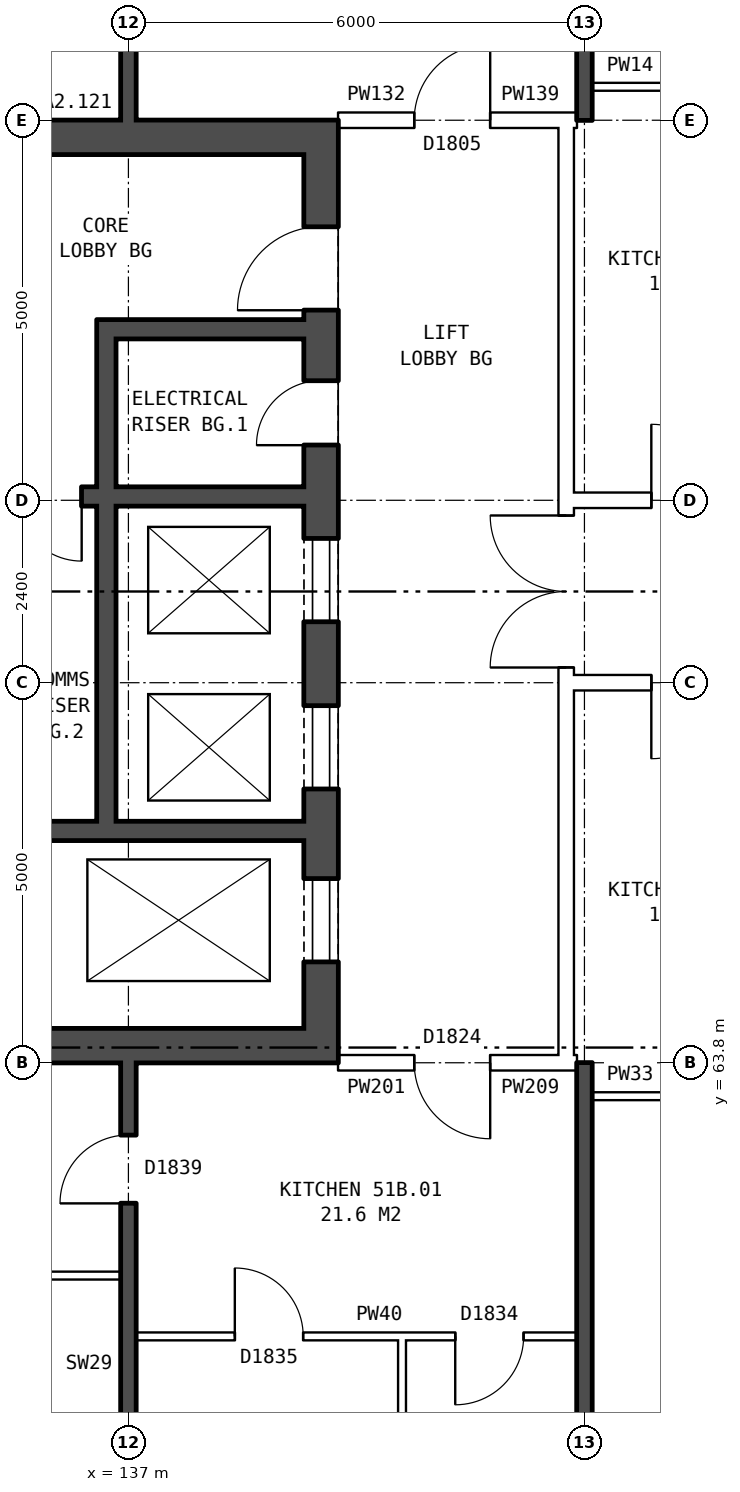
"""IFC4 building model, lengths in metres.
Left out: names, types, materials, properties, quantities, classifications, styles, units other than length and angle.
Written with IfcOpenShell. Run it as: python <this file> out.ifc"""

import sys

from ifc_helpers import new_model, si_unit, direction, frame, frame_2d, origin, place, context, subcontext, project, spatial, rectangle, extrude, element, fill, save


model = new_model("IFC4")
c1 = context("Model", 3, precision=1e-05, world=origin(), true_north=direction((0.0, 1.0)))
c2 = subcontext(c1, "Body", "Model", "MODEL_VIEW")
j1 = project(units=[si_unit("LENGTHUNIT", "METRE"), si_unit("PLANEANGLEUNIT", "RADIAN")], contexts=[c1])
p1 = place(None, origin())
s1 = spatial("IfcSite", under=j1, at=p1, CompositionType="ELEMENT")
p2 = place(p1, origin())
s2 = spatial("IfcBuilding", under=s1, at=p2, CompositionType="ELEMENT")
p3 = place(p2, frame((0.0, 0.0, 182.0)))
s3 = spatial("IfcBuildingStorey", under=s2, at=p3, CompositionType="ELEMENT", Elevation=182.0)
p4 = place(p3, frame((139.535, 63.8, 0.0), z_axis=(0.0, 0.0, 1.0), x_axis=(0.0, 1.0, 0.0)))
e1 = element("IfcWall", 1, at=p4, inside=s3, PredefinedType="SHEAR", context=c2, shape_type="SweptSolid", body=[
    extrude(rectangle(XDim=12.4, YDim=0.45, at=frame_2d((6.2, 0.0))), origin(), (0.0, 0.0, 1.0), 2.85),
])
p5 = place(p4, frame((1.325, 0.0, 0.0)))
e2 = element("IfcOpeningElement", 2, at=p5, cuts=e1, PredefinedType="OPENING", context=c2, shape_type="SweptSolid", body=[
    extrude(rectangle(XDim=1.1, YDim=2.1, at=frame_2d((0.55, 1.05))), frame((0.0, 0.235, 0.0), z_axis=(0.0, -1.0, 0.0), x_axis=(1.0, 0.0, 0.0)), (0.0, 0.0, 1.0), 0.47),
])
p6 = place(p4, frame((3.6, 0.0, 0.0)))
e3 = element("IfcOpeningElement", 3, at=p6, cuts=e1, PredefinedType="OPENING", context=c2, shape_type="SweptSolid", body=[
    extrude(rectangle(XDim=1.1, YDim=2.1, at=frame_2d((0.55, 1.05))), frame((0.0, 0.235, 0.0), z_axis=(0.0, -1.0, 0.0), x_axis=(1.0, 0.0, 0.0)), (0.0, 0.0, 1.0), 0.47),
])
p7 = place(p4, frame((5.8, 0.0, 0.0)))
e4 = element("IfcOpeningElement", 4, at=p7, cuts=e1, PredefinedType="OPENING", context=c2, shape_type="SweptSolid", body=[
    extrude(rectangle(XDim=1.1, YDim=2.1, at=frame_2d((0.55, 1.05))), frame((0.0, 0.235, 0.0), z_axis=(0.0, -1.0, 0.0), x_axis=(1.0, 0.0, 0.0)), (0.0, 0.0, 1.0), 0.47),
])
p8 = place(p4, frame((9.9, 0.0, 0.0)))
e5 = element("IfcOpeningElement", 5, at=p8, cuts=e1, PredefinedType="OPENING", context=c2, shape_type="SweptSolid", body=[
    extrude(rectangle(XDim=1.1, YDim=2.1, at=frame_2d((0.55, 1.05))), frame((0.0, 0.235, 0.0), z_axis=(0.0, -1.0, 0.0), x_axis=(1.0, 0.0, 0.0)), (0.0, 0.0, 1.0), 0.47),
])
p9 = place(p4, frame((8.125, 0.0, 0.0)))
e6 = element("IfcOpeningElement", 6, at=p9, cuts=e1, PredefinedType="OPENING", context=c2, shape_type="SweptSolid", body=[
    extrude(rectangle(XDim=0.85, YDim=2.1, at=frame_2d((0.425, 1.05))), frame((0.0, 0.235, 0.0), z_axis=(0.0, -1.0, 0.0), x_axis=(1.0, 0.0, 0.0)), (0.0, 0.0, 1.0), 0.47),
])
for number, where, z_axis, x_axis in (
    (7, (139.31, 64.025, 0.0), (0.0, 0.0, 1.0), (-1.0, 0.0, 0.0)),
    (8, (139.31, 75.975, 0.0), (0.0, 0.0, 1.0), (-1.0, 0.0, 0.0)),
):
    element("IfcWall", number, at=place(p3, frame(where, z_axis=z_axis, x_axis=x_axis)), inside=s3, PredefinedType="SHEAR", context=c2, shape_type="SweptSolid", body=[
        extrude(rectangle(XDim=7.5, YDim=0.45, at=frame_2d((3.75, 0.0))), origin(), (0.0, 0.0, 1.0), 2.85),
    ])
p10 = place(p3, frame((139.31, 66.85, 0.0), z_axis=(0.0, 0.0, 1.0), x_axis=(-1.0, 0.0, 0.0)))
e9 = element("IfcWall", 9, at=p10, inside=s3, PredefinedType="SHEAR", context=c2, shape_type="SweptSolid", body=[
    extrude(rectangle(XDim=4.675, YDim=0.25, at=frame_2d((2.337, 0.0))), origin(), (0.0, 0.0, 1.0), 2.85),
])
p11 = place(p3, frame((139.31, 71.25, 0.0), z_axis=(0.0, 0.0, 1.0), x_axis=(-1.0, 0.0, 0.0)))
e10 = element("IfcWall", 10, at=p11, inside=s3, PredefinedType="SHEAR", context=c2, shape_type="SweptSolid", body=[
    extrude(rectangle(XDim=7.5, YDim=0.25, at=frame_2d((3.75, 0.0))), origin(), (0.0, 0.0, 1.0), 2.85),
])
p12 = place(p11, frame((5.075, 0.0, 0.0)))
e11 = element("IfcOpeningElement", 11, at=p12, cuts=e10, PredefinedType="OPENING", context=c2, shape_type="SweptSolid", body=[
    extrude(rectangle(XDim=1.1, YDim=2.1, at=frame_2d((0.55, 1.05))), frame((0.0, 0.135, 0.0), z_axis=(0.0, -1.0, 0.0), x_axis=(1.0, 0.0, 0.0)), (0.0, 0.0, 1.0), 0.27),
])
p13 = place(p11, frame((2.925, 0.0, 0.0)))
e12 = element("IfcOpeningElement", 12, at=p13, cuts=e10, PredefinedType="OPENING", context=c2, shape_type="SweptSolid", body=[
    extrude(rectangle(XDim=0.85, YDim=2.1, at=frame_2d((0.425, 1.05))), frame((0.0, 0.135, 0.0), z_axis=(0.0, -1.0, 0.0), x_axis=(1.0, 0.0, 0.0)), (0.0, 0.0, 1.0), 0.27),
])
p14 = place(p3, frame((139.31, 73.45, 0.0), z_axis=(0.0, 0.0, 1.0), x_axis=(-1.0, 0.0, 0.0)))
e13 = element("IfcWall", 13, at=p14, inside=s3, PredefinedType="SHEAR", context=c2, shape_type="SweptSolid", body=[
    extrude(rectangle(XDim=2.475, YDim=0.25, at=frame_2d((1.238, 0.0))), origin(), (0.0, 0.0, 1.0), 2.85),
])
p15 = place(p3, frame((136.71, 66.975, 0.0), z_axis=(0.0, 0.0, 1.0), x_axis=(0.0, 1.0, 0.0)))
e14 = element("IfcWall", 14, at=p15, inside=s3, PredefinedType="SHEAR", context=c2, shape_type="SweptSolid", body=[
    extrude(rectangle(XDim=4.15, YDim=0.25, at=frame_2d((2.075, 0.0))), origin(), (0.0, 0.0, 1.0), 2.85),
])
p16 = place(p3, frame((136.71, 71.375, 0.0), z_axis=(0.0, 0.0, 1.0), x_axis=(0.0, 1.0, 0.0)))
e15 = element("IfcWall", 15, at=p16, inside=s3, PredefinedType="SHEAR", context=c2, shape_type="SweptSolid", body=[
    extrude(rectangle(XDim=2.2, YDim=0.25, at=frame_2d((1.1, 0.0))), origin(), (0.0, 0.0, 1.0), 2.85),
])
p17 = place(p3, frame((142.76, 63.9, 0.0), z_axis=(0.0, 0.0, 1.0), x_axis=(0.0, 1.0, 0.0)))
e16 = element("IfcWall", 16, at=p17, inside=s3, PredefinedType="PARTITIONING", context=c2, shape_type="SweptSolid", body=[
    extrude(rectangle(XDim=12.2, YDim=0.2, at=frame_2d((6.1, 0.0))), origin(), (0.0, 0.0, 1.0), 2.85),
])
p18 = place(p17, frame((5.1, 0.0, 0.0)))
e17 = element("IfcOpeningElement", 17, at=p18, cuts=e16, PredefinedType="OPENING", context=c2, shape_type="SweptSolid", body=[
    extrude(rectangle(XDim=2.0, YDim=2.1, at=frame_2d((1.0, 1.05))), frame((0.0, 0.11, 0.0), z_axis=(0.0, -1.0, 0.0), x_axis=(1.0, 0.0, 0.0)), (0.0, 0.0, 1.0), 0.22),
])
p19 = place(p3, frame((137.1, 60.2, 0.0), z_axis=(0.0, 0.0, 1.0), x_axis=(1.0, 0.0, 0.0)))
e18 = element("IfcWall", 18, at=p19, inside=s3, PredefinedType="PARTITIONING", context=c2, shape_type="SweptSolid", body=[
    extrude(rectangle(XDim=5.8, YDim=0.1, at=frame_2d((2.9, 0.0))), origin(), (0.0, 0.0, 1.0), 2.85),
])
p20 = place(p19, frame((1.3, 0.0, 0.0)))
e19 = element("IfcOpeningElement", 19, at=p20, cuts=e18, PredefinedType="OPENING", context=c2, shape_type="SweptSolid", body=[
    extrude(rectangle(XDim=0.9, YDim=2.1, at=frame_2d((0.45, 1.05))), frame((0.0, 0.06, 0.0), z_axis=(0.0, -1.0, 0.0), x_axis=(1.0, 0.0, 0.0)), (0.0, 0.0, 1.0), 0.12),
])
p21 = place(p19, frame((4.2, 0.0, 0.0)))
e20 = element("IfcOpeningElement", 20, at=p21, cuts=e18, PredefinedType="OPENING", context=c2, shape_type="SweptSolid", body=[
    extrude(rectangle(XDim=0.9, YDim=2.1, at=frame_2d((0.45, 1.05))), frame((0.0, 0.06, 0.0), z_axis=(0.0, -1.0, 0.0), x_axis=(1.0, 0.0, 0.0)), (0.0, 0.0, 1.0), 0.12),
])
p22 = place(p3, frame((131.36, 61.0, 0.0), z_axis=(0.0, 0.0, 1.0), x_axis=(1.0, 0.0, 0.0)))
e21 = element("IfcWall", 21, at=p22, inside=s3, PredefinedType="PARTITIONING", context=c2, shape_type="SweptSolid", body=[
    extrude(rectangle(XDim=5.54, YDim=0.1, at=frame_2d((2.77, 0.0))), origin(), (0.0, 0.0, 1.0), 2.85),
])
p23 = place(p3, frame((143.1, 63.36, 0.0), z_axis=(0.0, 0.0, 1.0), x_axis=(1.0, 0.0, 0.0)))
e22 = element("IfcWall", 22, at=p23, inside=s3, PredefinedType="PARTITIONING", context=c2, shape_type="SweptSolid", body=[
    extrude(rectangle(XDim=2.9, YDim=0.1, at=frame_2d((1.45, 0.0))), origin(), (0.0, 0.0, 1.0), 2.85),
])
p24 = place(p23, frame((1.0, 0.0, 0.0)))
e23 = element("IfcOpeningElement", 23, at=p24, cuts=e22, PredefinedType="OPENING", context=c2, shape_type="SweptSolid", body=[
    extrude(rectangle(XDim=0.9, YDim=2.1, at=frame_2d((0.45, 1.05))), frame((0.0, 0.06, 0.0), z_axis=(0.0, -1.0, 0.0), x_axis=(1.0, 0.0, 0.0)), (0.0, 0.0, 1.0), 0.12),
])
p25 = place(p3, frame((139.76, 63.8, 0.0), z_axis=(0.0, 0.0, 1.0), x_axis=(1.0, 0.0, 0.0)))
e24 = element("IfcWall", 24, at=p25, inside=s3, PredefinedType="PARTITIONING", context=c2, shape_type="SweptSolid", body=[
    extrude(rectangle(XDim=3.0, YDim=0.2, at=frame_2d((1.5, 0.0))), origin(), (0.0, 0.0, 1.0), 2.85),
])
p26 = place(p25, frame((1.0, 0.0, 0.0)))
e25 = element("IfcOpeningElement", 25, at=p26, cuts=e24, PredefinedType="OPENING", context=c2, shape_type="SweptSolid", body=[
    extrude(rectangle(XDim=1.0, YDim=2.1, at=frame_2d((0.5, 1.05))), frame((0.0, 0.11, 0.0), z_axis=(0.0, -1.0, 0.0), x_axis=(1.0, 0.0, 0.0)), (0.0, 0.0, 1.0), 0.22),
])
p27 = place(p3, frame((142.76, 63.8, 0.0), z_axis=(0.0, 0.0, 1.0), x_axis=(1.0, 0.0, 0.0)))
e26 = element("IfcWall", 26, at=p27, inside=s3, PredefinedType="PARTITIONING", context=c2, shape_type="SweptSolid", body=[
    extrude(rectangle(XDim=0.14, YDim=0.2, at=frame_2d((0.07, 0.0))), origin(), (0.0, 0.0, 1.0), 2.85),
])
p28 = place(p3, frame((142.76, 68.8, 0.0), z_axis=(0.0, 0.0, 1.0), x_axis=(1.0, 0.0, 0.0)))
e27 = element("IfcWall", 27, at=p28, inside=s3, PredefinedType="PARTITIONING", context=c2, shape_type="SweptSolid", body=[
    extrude(rectangle(XDim=14.48, YDim=0.2, at=frame_2d((7.24, 0.0))), origin(), (0.0, 0.0, 1.0), 2.85),
])
p29 = place(p28, frame((1.12, 0.0, 0.0)))
e28 = element("IfcOpeningElement", 28, at=p29, cuts=e27, PredefinedType="OPENING", context=c2, shape_type="SweptSolid", body=[
    extrude(rectangle(XDim=1.0, YDim=2.1, at=frame_2d((0.5, 1.05))), frame((0.0, 0.11, 0.0), z_axis=(0.0, -1.0, 0.0), x_axis=(1.0, 0.0, 0.0)), (0.0, 0.0, 1.0), 0.22),
])
p30 = place(p28, frame((10.24, 0.0, 0.0)))
e29 = element("IfcOpeningElement", 29, at=p30, cuts=e27, PredefinedType="OPENING", context=c2, shape_type="SweptSolid", body=[
    extrude(rectangle(XDim=1.0, YDim=2.1, at=frame_2d((0.5, 1.05))), frame((0.0, 0.11, 0.0), z_axis=(0.0, -1.0, 0.0), x_axis=(1.0, 0.0, 0.0)), (0.0, 0.0, 1.0), 0.22),
])
p31 = place(p3, frame((142.76, 71.2, 0.0), z_axis=(0.0, 0.0, 1.0), x_axis=(1.0, 0.0, 0.0)))
e30 = element("IfcWall", 30, at=p31, inside=s3, PredefinedType="PARTITIONING", context=c2, shape_type="SweptSolid", body=[
    extrude(rectangle(XDim=14.48, YDim=0.2, at=frame_2d((7.24, 0.0))), origin(), (0.0, 0.0, 1.0), 2.85),
])
p32 = place(p31, frame((1.12, 0.0, 0.0)))
e31 = element("IfcOpeningElement", 31, at=p32, cuts=e30, PredefinedType="OPENING", context=c2, shape_type="SweptSolid", body=[
    extrude(rectangle(XDim=1.0, YDim=2.1, at=frame_2d((0.5, 1.05))), frame((0.0, 0.11, 0.0), z_axis=(0.0, -1.0, 0.0), x_axis=(1.0, 0.0, 0.0)), (0.0, 0.0, 1.0), 0.22),
])
p33 = place(p31, frame((7.24, 0.0, 0.0)))
e32 = element("IfcOpeningElement", 32, at=p33, cuts=e30, PredefinedType="OPENING", context=c2, shape_type="SweptSolid", body=[
    extrude(rectangle(XDim=1.0, YDim=2.1, at=frame_2d((0.5, 1.05))), frame((0.0, 0.11, 0.0), z_axis=(0.0, -1.0, 0.0), x_axis=(1.0, 0.0, 0.0)), (0.0, 0.0, 1.0), 0.22),
])
p34 = place(p3, frame((139.76, 76.2, 0.0), z_axis=(0.0, 0.0, 1.0), x_axis=(1.0, 0.0, 0.0)))
e33 = element("IfcWall", 33, at=p34, inside=s3, PredefinedType="PARTITIONING", context=c2, shape_type="SweptSolid", body=[
    extrude(rectangle(XDim=3.0, YDim=0.2, at=frame_2d((1.5, 0.0))), origin(), (0.0, 0.0, 1.0), 2.85),
])
p35 = place(p34, frame((1.0, 0.0, 0.0)))
e34 = element("IfcOpeningElement", 34, at=p35, cuts=e33, PredefinedType="OPENING", context=c2, shape_type="SweptSolid", body=[
    extrude(rectangle(XDim=1.0, YDim=2.1, at=frame_2d((0.5, 1.05))), frame((0.0, 0.11, 0.0), z_axis=(0.0, -1.0, 0.0), x_axis=(1.0, 0.0, 0.0)), (0.0, 0.0, 1.0), 0.22),
])
p36 = place(p3, frame((142.76, 76.2, 0.0), z_axis=(0.0, 0.0, 1.0), x_axis=(1.0, 0.0, 0.0)))
e35 = element("IfcWall", 35, at=p36, inside=s3, PredefinedType="PARTITIONING", context=c2, shape_type="SweptSolid", body=[
    extrude(rectangle(XDim=0.14, YDim=0.2, at=frame_2d((0.07, 0.0))), origin(), (0.0, 0.0, 1.0), 2.85),
])
p37 = place(p3, frame((143.1, 76.64, 0.0), z_axis=(0.0, 0.0, 1.0), x_axis=(1.0, 0.0, 0.0)))
e36 = element("IfcWall", 36, at=p37, inside=s3, PredefinedType="PARTITIONING", context=c2, shape_type="SweptSolid", body=[
    extrude(rectangle(XDim=2.9, YDim=0.1, at=frame_2d((1.45, 0.0))), origin(), (0.0, 0.0, 1.0), 2.85),
])
p38 = place(p37, frame((1.0, 0.0, 0.0)))
e37 = element("IfcOpeningElement", 37, at=p38, cuts=e36, PredefinedType="OPENING", context=c2, shape_type="SweptSolid", body=[
    extrude(rectangle(XDim=0.9, YDim=2.1, at=frame_2d((0.45, 1.05))), frame((0.0, 0.06, 0.0), z_axis=(0.0, -1.0, 0.0), x_axis=(1.0, 0.0, 0.0)), (0.0, 0.0, 1.0), 0.12),
])
p39 = place(p3, frame((137.0, 54.36, 0.0), z_axis=(0.0, 0.0, 1.0), x_axis=(0.0, 1.0, 0.0)))
e38 = element("IfcWall", 38, at=p39, inside=s3, PredefinedType="SOLIDWALL", context=c2, shape_type="SweptSolid", body=[
    extrude(rectangle(XDim=9.44, YDim=0.2, at=frame_2d((4.72, 0.0))), origin(), (0.0, 0.0, 1.0), 2.85),
])
p40 = place(p39, frame((2.47, 0.0, 0.0)))
e39 = element("IfcOpeningElement", 39, at=p40, cuts=e38, PredefinedType="OPENING", context=c2, shape_type="SweptSolid", body=[
    extrude(rectangle(XDim=0.9, YDim=2.1, at=frame_2d((0.45, 1.05))), frame((0.0, 0.11, 0.0), z_axis=(0.0, -1.0, 0.0), x_axis=(1.0, 0.0, 0.0)), (0.0, 0.0, 1.0), 0.22),
])
p41 = place(p39, frame((7.59, 0.0, 0.0)))
e40 = element("IfcOpeningElement", 40, at=p41, cuts=e38, PredefinedType="OPENING", context=c2, shape_type="SweptSolid", body=[
    extrude(rectangle(XDim=0.9, YDim=2.1, at=frame_2d((0.45, 1.05))), frame((0.0, 0.11, 0.0), z_axis=(0.0, -1.0, 0.0), x_axis=(1.0, 0.0, 0.0)), (0.0, 0.0, 1.0), 0.22),
])
p42 = place(p3, frame((137.0, 76.2, 0.0), z_axis=(0.0, 0.0, 1.0), x_axis=(0.0, 1.0, 0.0)))
e41 = element("IfcWall", 41, at=p42, inside=s3, PredefinedType="SOLIDWALL", context=c2, shape_type="SweptSolid", body=[
    extrude(rectangle(XDim=9.44, YDim=0.2, at=frame_2d((4.72, 0.0))), origin(), (0.0, 0.0, 1.0), 2.85),
])
p43 = place(p42, frame((1.5, 0.0, 0.0)))
e42 = element("IfcOpeningElement", 42, at=p43, cuts=e41, PredefinedType="OPENING", context=c2, shape_type="SweptSolid", body=[
    extrude(rectangle(XDim=0.9, YDim=2.1, at=frame_2d((0.45, 1.05))), frame((0.0, 0.11, 0.0), z_axis=(0.0, -1.0, 0.0), x_axis=(1.0, 0.0, 0.0)), (0.0, 0.0, 1.0), 0.22),
])
p44 = place(p3, frame((140.6, 57.85, 0.0), z_axis=(0.0, 0.0, 1.0), x_axis=(0.0, 1.0, 0.0)))
e43 = element("IfcWall", 43, at=p44, inside=s3, PredefinedType="PARTITIONING", context=c2, shape_type="SweptSolid", body=[
    extrude(rectangle(XDim=2.3, YDim=0.1, at=frame_2d((1.15, 0.0))), origin(), (0.0, 0.0, 1.0), 2.85),
])
for number, where, z_axis, x_axis in (
    (44, (143.0, 54.36, 0.0), (0.0, 0.0, 1.0), (0.0, 1.0, 0.0)),
    (45, (143.0, 76.2, 0.0), (0.0, 0.0, 1.0), (0.0, 1.0, 0.0)),
):
    element("IfcWall", number, at=place(p3, frame(where, z_axis=z_axis, x_axis=x_axis)), inside=s3, PredefinedType="SOLIDWALL", context=c2, shape_type="SweptSolid", body=[
        extrude(rectangle(XDim=9.44, YDim=0.2, at=frame_2d((4.72, 0.0))), origin(), (0.0, 0.0, 1.0), 2.85),
    ])
p45 = place(p5, origin())
e46 = element("IfcDoor", 46, at=p45, inside=s3, OperationType="DOUBLE_DOOR_SLIDING", PredefinedType="DOOR", context=c2, shape_type="SweptSolid", body=[
    extrude(rectangle(XDim=1.1, YDim=2.1, at=frame_2d((0.55, 1.05))), frame((0.0, 0.21, 0.0), z_axis=(0.0, -1.0, 0.0), x_axis=(1.0, 0.0, 0.0)), (0.0, 0.0, 1.0), 0.05),
])
fill(e2, e46)
p46 = place(p6, origin())
e47 = element("IfcDoor", 47, at=p46, inside=s3, OperationType="DOUBLE_DOOR_SLIDING", PredefinedType="DOOR", context=c2, shape_type="SweptSolid", body=[
    extrude(rectangle(XDim=1.1, YDim=2.1, at=frame_2d((0.55, 1.05))), frame((0.0, 0.21, 0.0), z_axis=(0.0, -1.0, 0.0), x_axis=(1.0, 0.0, 0.0)), (0.0, 0.0, 1.0), 0.05),
])
fill(e3, e47)
p47 = place(p7, origin())
e48 = element("IfcDoor", 48, at=p47, inside=s3, OperationType="DOUBLE_DOOR_SLIDING", PredefinedType="DOOR", context=c2, shape_type="SweptSolid", body=[
    extrude(rectangle(XDim=1.1, YDim=2.1, at=frame_2d((0.55, 1.05))), frame((0.0, 0.21, 0.0), z_axis=(0.0, -1.0, 0.0), x_axis=(1.0, 0.0, 0.0)), (0.0, 0.0, 1.0), 0.05),
])
fill(e4, e48)
p48 = place(p8, origin())
e49 = element("IfcDoor", 49, at=p48, inside=s3, OperationType="SINGLE_SWING_LEFT", PredefinedType="DOOR", context=c2, shape_type="SweptSolid", body=[
    extrude(rectangle(XDim=1.1, YDim=2.1, at=frame_2d((0.55, 1.05))), frame((0.0, 0.21, 0.0), z_axis=(0.0, -1.0, 0.0), x_axis=(1.0, 0.0, 0.0)), (0.0, 0.0, 1.0), 0.05),
])
fill(e5, e49)
p49 = place(p9, origin())
e50 = element("IfcDoor", 50, at=p49, inside=s3, OperationType="SINGLE_SWING_LEFT", PredefinedType="DOOR", context=c2, shape_type="SweptSolid", body=[
    extrude(rectangle(XDim=0.85, YDim=2.1, at=frame_2d((0.425, 1.05))), frame((0.0, 0.21, 0.0), z_axis=(0.0, -1.0, 0.0), x_axis=(1.0, 0.0, 0.0)), (0.0, 0.0, 1.0), 0.05),
])
fill(e6, e50)
p50 = place(p13, origin())
e51 = element("IfcDoor", 51, at=p50, inside=s3, OperationType="SINGLE_SWING_LEFT", PredefinedType="DOOR", context=c2, shape_type="SweptSolid", body=[
    extrude(rectangle(XDim=0.85, YDim=2.1, at=frame_2d((0.425, 1.05))), frame((0.0, 0.025, 0.0), z_axis=(0.0, -1.0, 0.0), x_axis=(1.0, 0.0, 0.0)), (0.0, 0.0, 1.0), 0.05),
])
fill(e12, e51)
p51 = place(p18, origin())
e52 = element("IfcDoor", 52, at=p51, inside=s3, OperationType="DOUBLE_DOOR_SINGLE_SWING", PredefinedType="DOOR", context=c2, shape_type="SweptSolid", body=[
    extrude(rectangle(XDim=2.0, YDim=2.1, at=frame_2d((1.0, 1.05))), frame((0.0, 0.025, 0.0), z_axis=(0.0, -1.0, 0.0), x_axis=(1.0, 0.0, 0.0)), (0.0, 0.0, 1.0), 0.05),
])
fill(e17, e52)
p52 = place(p41, origin())
e53 = element("IfcDoor", 53, at=p52, inside=s3, OperationType="SINGLE_SWING_LEFT", PredefinedType="DOOR", context=c2, shape_type="SweptSolid", body=[
    extrude(rectangle(XDim=0.9, YDim=2.1, at=frame_2d((0.45, 1.05))), frame((0.0, 0.025, 0.0), z_axis=(0.0, -1.0, 0.0), x_axis=(1.0, 0.0, 0.0)), (0.0, 0.0, 1.0), 0.05),
])
fill(e40, e53)
p53 = place(p26, frame((1.0, 0.0, 0.0), z_axis=(0.0, 0.0, 1.0), x_axis=(-1.0, 0.0, 0.0)))
e54 = element("IfcDoor", 54, at=p53, inside=s3, OperationType="SINGLE_SWING_LEFT", PredefinedType="DOOR", context=c2, shape_type="SweptSolid", body=[
    extrude(rectangle(XDim=1.0, YDim=2.1, at=frame_2d((0.5, 1.05))), frame((0.0, 0.025, 0.0), z_axis=(0.0, -1.0, 0.0), x_axis=(1.0, 0.0, 0.0)), (0.0, 0.0, 1.0), 0.05),
])
fill(e25, e54)
p54 = place(p20, origin())
e55 = element("IfcDoor", 55, at=p54, inside=s3, OperationType="SINGLE_SWING_LEFT", PredefinedType="DOOR", context=c2, shape_type="SweptSolid", body=[
    extrude(rectangle(XDim=0.9, YDim=2.1, at=frame_2d((0.45, 1.05))), frame((0.0, 0.025, 0.0), z_axis=(0.0, -1.0, 0.0), x_axis=(1.0, 0.0, 0.0)), (0.0, 0.0, 1.0), 0.05),
])
fill(e19, e55)
p55 = place(p21, frame((0.9, 0.0, 0.0), z_axis=(0.0, 0.0, 1.0), x_axis=(-1.0, 0.0, 0.0)))
e56 = element("IfcDoor", 56, at=p55, inside=s3, OperationType="SINGLE_SWING_RIGHT", PredefinedType="DOOR", context=c2, shape_type="SweptSolid", body=[
    extrude(rectangle(XDim=0.9, YDim=2.1, at=frame_2d((0.45, 1.05))), frame((0.0, 0.025, 0.0), z_axis=(0.0, -1.0, 0.0), x_axis=(1.0, 0.0, 0.0)), (0.0, 0.0, 1.0), 0.05),
])
fill(e20, e56)
p56 = place(p35, origin())
e57 = element("IfcDoor", 57, at=p56, inside=s3, OperationType="SINGLE_SWING_RIGHT", PredefinedType="DOOR", context=c2, shape_type="SweptSolid", body=[
    extrude(rectangle(XDim=1.0, YDim=2.1, at=frame_2d((0.5, 1.05))), frame((0.0, 0.025, 0.0), z_axis=(0.0, -1.0, 0.0), x_axis=(1.0, 0.0, 0.0)), (0.0, 0.0, 1.0), 0.05),
])
fill(e34, e57)
p57 = place(p29, frame((1.0, 0.0, 0.0), z_axis=(0.0, 0.0, 1.0), x_axis=(-1.0, 0.0, 0.0)))
e58 = element("IfcDoor", 58, at=p57, inside=s3, OperationType="SINGLE_SWING_RIGHT", PredefinedType="DOOR", context=c2, shape_type="SweptSolid", body=[
    extrude(rectangle(XDim=1.0, YDim=2.1, at=frame_2d((0.5, 1.05))), frame((0.0, 0.025, 0.0), z_axis=(0.0, -1.0, 0.0), x_axis=(1.0, 0.0, 0.0)), (0.0, 0.0, 1.0), 0.05),
])
fill(e28, e58)
p58 = place(p32, origin())
e59 = element("IfcDoor", 59, at=p58, inside=s3, OperationType="SINGLE_SWING_LEFT", PredefinedType="DOOR", context=c2, shape_type="SweptSolid", body=[
    extrude(rectangle(XDim=1.0, YDim=2.1, at=frame_2d((0.5, 1.05))), frame((0.0, 0.025, 0.0), z_axis=(0.0, -1.0, 0.0), x_axis=(1.0, 0.0, 0.0)), (0.0, 0.0, 1.0), 0.05),
])
fill(e31, e59)
save(model, sys.argv[1])
